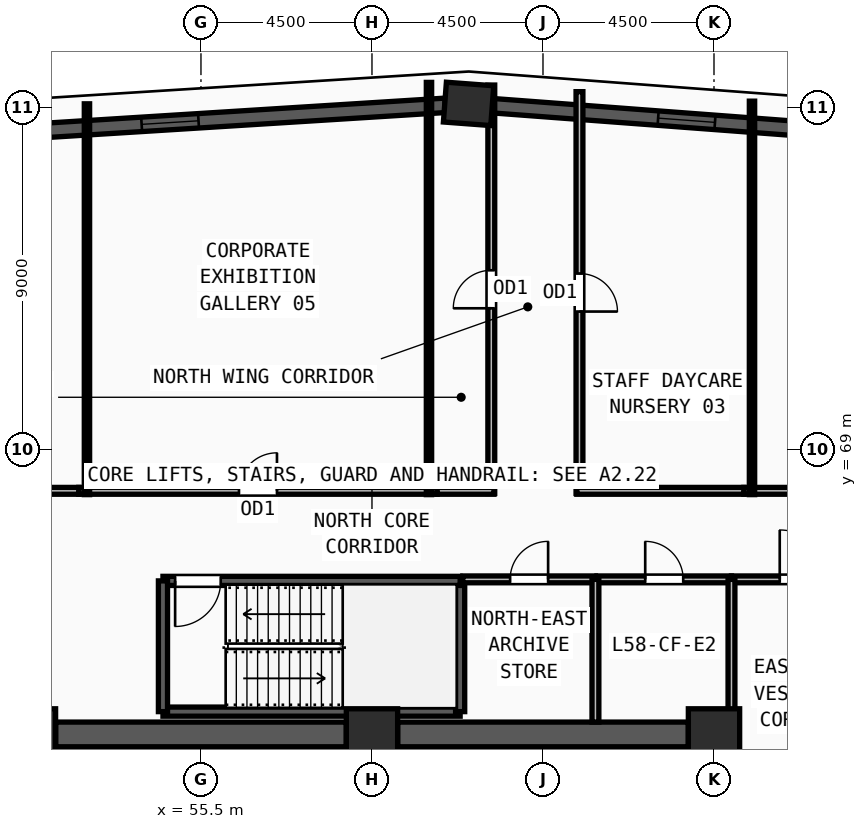
"""IFC4 building model, lengths in metres.
Left out: names, types, materials, properties, quantities, classifications, styles, units other than length and angle.
Written with IfcOpenShell. Run it as: python <this file> out.ifc"""

import sys

from ifc_helpers import new_model, si_unit, direction, frame, frame_2d, origin, origin_2d, place, context, subcontext, project, spatial, rectangle, extrude, source, transform, mapped, element, fill, save


model = new_model("IFC4")
c1 = context("Model", 3, precision=1e-05, world=origin(), true_north=direction((0.0, 1.0)))
c2 = subcontext(c1, "Body", "Model", "MODEL_VIEW")
j1 = project(units=[si_unit("LENGTHUNIT", "METRE"), si_unit("PLANEANGLEUNIT", "RADIAN")], contexts=[c1])
p1 = place(None, origin())
s1 = spatial("IfcSite", under=j1, at=p1, CompositionType="ELEMENT")
p2 = place(p1, origin())
s2 = spatial("IfcBuilding", under=s1, at=p2, CompositionType="ELEMENT")
p3 = place(p2, frame((0.0, 0.0, 224.25)))
s3 = spatial("IfcBuildingStorey", under=s2, at=p3, CompositionType="ELEMENT", Elevation=224.25)
m1 = source(origin(), c2, "Body", "SweptSolid", [
    extrude(rectangle(XDim=1.35, YDim=1.35, at=origin_2d()), origin(), (0.0, 0.0, 1.0), 3.75),
])
for number, where, z_axis, x_axis in (
    (1, (69.0, 61.5, 0.0), (0.0, 0.0, 1.0), (1.0, 0.0, 0.0)),
    (2, (60.0, 61.5, 0.0), (0.0, 0.0, 1.0), (1.0, 0.0, 0.0)),
    (3, (51.0, 61.5, 0.0), (0.0, 0.0, 1.0), (1.0, 0.0, 0.0)),
):
    element("IfcColumn", number, at=place(p3, frame(where, z_axis=z_axis, x_axis=x_axis)), inside=s3, PredefinedType="COLUMN", context=c2, shape_type="MappedRepresentation", body=[
        mapped(m1, transform((0.0, 0.0, 0.0), x_axis=(1.0, 0.0, 0.0), y_axis=(0.0, 1.0, 0.0), z_axis=(0.0, 0.0, 1.0), scale=1.0)),
    ])
m2 = source(origin(), c2, "Body", "SweptSolid", [
    extrude(rectangle(XDim=1.25, YDim=1.05, at=origin_2d()), origin(), (0.0, 0.0, 1.0), 3.75),
])
p4 = place(p3, frame((62.542, 78.091, 0.0), z_axis=(0.0, 0.0, 1.0), x_axis=(-0.997198204594, 0.074804684047, 0.0)))
e4 = element("IfcColumn", 4, at=p4, inside=s3, PredefinedType="COLUMN", context=c2, shape_type="MappedRepresentation", body=[
    mapped(m2, transform((0.0, 0.0, 0.0), x_axis=(1.0, 0.0, 0.0), y_axis=(0.0, 1.0, 0.0), z_axis=(0.0, 0.0, 1.0), scale=1.0)),
])
p5 = place(p3, frame((87.036, 76.253, 0.0), z_axis=(0.0, 0.0, 1.0), x_axis=(-0.997196419931, 0.07482847103, 0.0)))
e5 = element("IfcWall", 5, at=p5, inside=s3, PredefinedType="SOLIDWALL", context=c2, shape_type="SweptSolid", body=[
    extrude(rectangle(XDim=23.948, YDim=0.38, at=frame_2d((11.974, 0.0))), origin(), (0.0, 0.0, 1.0), 3.57),
])
m3 = source(origin(), c2, "Body", "SweptSolid", [
    extrude(rectangle(XDim=1.5, YDim=1.9, at=frame_2d((0.75, 0.95))), frame((0.0, 0.2, 0.0), z_axis=(0.0, -1.0, 0.0), x_axis=(1.0, 0.0, 0.0)), (0.0, 0.0, 1.0), 0.4),
])
p6 = place(p5, frame((5.237, 0.0, 0.55)))
e6 = element("IfcOpeningElement", 6, at=p6, cuts=e5, PredefinedType="OPENING", context=c2, shape_type="MappedRepresentation", body=[
    mapped(m3, transform((0.0, 0.0, 0.0), x_axis=(1.0, 0.0, 0.0), y_axis=(0.0, 1.0, 0.0), z_axis=(0.0, 0.0, 1.0), scale=1.0)),
])
p7 = place(p5, frame((11.224, 0.0, 0.55)))
e7 = element("IfcOpeningElement", 7, at=p7, cuts=e5, PredefinedType="OPENING", context=c2, shape_type="MappedRepresentation", body=[
    mapped(m3, transform((0.0, 0.0, 0.0), x_axis=(1.0, 0.0, 0.0), y_axis=(0.0, 1.0, 0.0), z_axis=(0.0, 0.0, 1.0), scale=1.0)),
])
p8 = place(p5, frame((18.061, 0.0, 0.55)))
e8 = element("IfcOpeningElement", 8, at=p8, cuts=e5, PredefinedType="OPENING", context=c2, shape_type="MappedRepresentation", body=[
    mapped(m3, transform((0.0, 0.0, 0.0), x_axis=(1.0, 0.0, 0.0), y_axis=(0.0, 1.0, 0.0), z_axis=(0.0, 0.0, 1.0), scale=1.0)),
])
p9 = place(p3, frame((61.928, 78.053, 0.0), z_axis=(0.0, 0.0, 1.0), x_axis=(-0.998042647874, -0.062536973258, 0.0)))
e9 = element("IfcWall", 9, at=p9, inside=s3, PredefinedType="SOLIDWALL", context=c2, shape_type="SweptSolid", body=[
    extrude(rectangle(XDim=29.022, YDim=0.38, at=frame_2d((14.511, 0.0))), origin(), (0.0, 0.0, 1.0), 3.57),
])
p10 = place(p9, frame((6.505, 0.0, 0.55)))
e10 = element("IfcOpeningElement", 10, at=p10, cuts=e9, PredefinedType="OPENING", context=c2, shape_type="MappedRepresentation", body=[
    mapped(m3, transform((0.0, 0.0, 0.0), x_axis=(1.0, 0.0, 0.0), y_axis=(0.0, 1.0, 0.0), z_axis=(0.0, 0.0, 1.0), scale=1.0)),
])
p11 = place(p9, frame((13.761, 0.0, 0.55)))
e11 = element("IfcOpeningElement", 11, at=p11, cuts=e9, PredefinedType="OPENING", context=c2, shape_type="MappedRepresentation", body=[
    mapped(m3, transform((0.0, 0.0, 0.0), x_axis=(1.0, 0.0, 0.0), y_axis=(0.0, 1.0, 0.0), z_axis=(0.0, 0.0, 1.0), scale=1.0)),
])
p12 = place(p9, frame((21.016, 0.0, 0.55)))
e12 = element("IfcOpeningElement", 12, at=p12, cuts=e9, PredefinedType="OPENING", context=c2, shape_type="MappedRepresentation", body=[
    mapped(m3, transform((0.0, 0.0, 0.0), x_axis=(1.0, 0.0, 0.0), y_axis=(0.0, 1.0, 0.0), z_axis=(0.0, 0.0, 1.0), scale=1.0)),
])
for number, where, z_axis, x_axis in (
    (13, (51.675, 61.5, 0.0), (0.0, 0.0, 1.0), (1.0, 0.0, 0.0)),
    (14, (60.675, 61.5, 0.0), (0.0, 0.0, 1.0), (1.0, 0.0, 0.0)),
):
    element("IfcWall", number, at=place(p3, frame(where, z_axis=z_axis, x_axis=x_axis)), inside=s3, PredefinedType="SHEAR", context=c2, shape_type="SweptSolid", body=[
        extrude(rectangle(XDim=7.65, YDim=0.65, at=frame_2d((3.825, 0.0))), origin(), (0.0, 0.0, 1.0), 3.57),
    ])
p13 = place(p3, frame((54.5, 62.1, 0.0), z_axis=(0.0, 0.0, 1.0), x_axis=(1.0, 0.0, 0.0)))
e15 = element("IfcWall", 15, at=p13, inside=s3, PredefinedType="SOLIDWALL", context=c2, shape_type="SweptSolid", body=[
    extrude(rectangle(XDim=7.82, YDim=0.24, at=frame_2d((3.91, 0.0))), origin(), (0.0, 0.0, 1.0), 3.57),
])
p14 = place(p3, frame((62.32, 62.1, 0.0), z_axis=(0.0, 0.0, 1.0), x_axis=(0.0, 1.0, 0.0)))
e16 = element("IfcWall", 16, at=p14, inside=s3, PredefinedType="SOLIDWALL", context=c2, shape_type="SweptSolid", body=[
    extrude(rectangle(XDim=3.44, YDim=0.24, at=frame_2d((1.72, 0.0))), origin(), (0.0, 0.0, 1.0), 3.57),
])
p15 = place(p3, frame((62.32, 65.54, 0.0), z_axis=(0.0, 0.0, 1.0), x_axis=(-1.0, 0.0, 0.0)))
e17 = element("IfcWall", 17, at=p15, inside=s3, PredefinedType="SOLIDWALL", context=c2, shape_type="SweptSolid", body=[
    extrude(rectangle(XDim=7.82, YDim=0.24, at=frame_2d((3.91, 0.0))), origin(), (0.0, 0.0, 1.0), 3.57),
])
m4 = source(origin(), c2, "Body", "SweptSolid", [
    extrude(rectangle(XDim=1.2, YDim=2.2, at=frame_2d((0.6, 1.1))), frame((0.0, 0.13, 0.0), z_axis=(0.0, -1.0, 0.0), x_axis=(1.0, 0.0, 0.0)), (0.0, 0.0, 1.0), 0.26),
])
p16 = place(p15, frame((6.3, 0.0, 0.0)))
e18 = element("IfcOpeningElement", 18, at=p16, cuts=e17, PredefinedType="OPENING", context=c2, shape_type="MappedRepresentation", body=[
    mapped(m4, transform((0.0, 0.0, 0.0), x_axis=(1.0, 0.0, 0.0), y_axis=(0.0, 1.0, 0.0), z_axis=(0.0, 0.0, 1.0), scale=1.0)),
])
p17 = place(p3, frame((54.5, 65.54, 0.0), z_axis=(0.0, 0.0, 1.0), x_axis=(0.0, -1.0, 0.0)))
e19 = element("IfcWall", 19, at=p17, inside=s3, PredefinedType="SOLIDWALL", context=c2, shape_type="SweptSolid", body=[
    extrude(rectangle(XDim=3.44, YDim=0.24, at=frame_2d((1.72, 0.0))), origin(), (0.0, 0.0, 1.0), 3.57),
])
p18 = place(p3, frame((62.39, 65.58, 0.0), z_axis=(0.0, 0.0, 1.0), x_axis=(1.0, 0.0, 0.0)))
e20 = element("IfcWall", 20, at=p18, inside=s3, PredefinedType="PARTITIONING", context=c2, shape_type="SweptSolid", body=[
    extrude(rectangle(XDim=3.49, YDim=0.18, at=frame_2d((1.745, 0.0))), origin(), (0.0, 0.0, 1.0), 3.57),
])
m5 = source(origin(), c2, "Body", "SweptSolid", [
    extrude(rectangle(XDim=1.0, YDim=2.2, at=frame_2d((0.5, 1.1))), frame((0.0, 0.1, 0.0), z_axis=(0.0, -1.0, 0.0), x_axis=(1.0, 0.0, 0.0)), (0.0, 0.0, 1.0), 0.2),
])
p19 = place(p18, frame((1.245, 0.0, 0.0)))
e21 = element("IfcOpeningElement", 21, at=p19, cuts=e20, PredefinedType="OPENING", context=c2, shape_type="MappedRepresentation", body=[
    mapped(m5, transform((0.0, 0.0, 0.0), x_axis=(1.0, 0.0, 0.0), y_axis=(0.0, 1.0, 0.0), z_axis=(0.0, 0.0, 1.0), scale=1.0)),
])
p20 = place(p3, frame((65.92, 65.58, 0.0), z_axis=(0.0, 0.0, 1.0), x_axis=(1.0, 0.0, 0.0)))
e22 = element("IfcWall", 22, at=p20, inside=s3, PredefinedType="PARTITIONING", context=c2, shape_type="SweptSolid", body=[
    extrude(rectangle(XDim=3.54, YDim=0.18, at=frame_2d((1.77, 0.0))), origin(), (0.0, 0.0, 1.0), 3.57),
])
p21 = place(p20, frame((1.27, 0.0, 0.0)))
e23 = element("IfcOpeningElement", 23, at=p21, cuts=e22, PredefinedType="OPENING", context=c2, shape_type="MappedRepresentation", body=[
    mapped(m5, transform((0.0, 0.0, 0.0), x_axis=(1.0, 0.0, 0.0), y_axis=(0.0, 1.0, 0.0), z_axis=(0.0, 0.0, 1.0), scale=1.0)),
])
p22 = place(p3, frame((69.46, 65.58, 0.0), z_axis=(0.0, 0.0, 1.0), x_axis=(1.0, 0.0, 0.0)))
e24 = element("IfcWall", 24, at=p22, inside=s3, PredefinedType="PARTITIONING", context=c2, shape_type="SweptSolid", body=[
    extrude(rectangle(XDim=3.84, YDim=0.18, at=frame_2d((1.92, 0.0))), origin(), (0.0, 0.0, 1.0), 3.57),
])
m6 = source(origin(), c2, "Body", "SweptSolid", [
    extrude(rectangle(XDim=1.3, YDim=2.2, at=frame_2d((0.65, 1.1))), frame((0.0, 0.1, 0.0), z_axis=(0.0, -1.0, 0.0), x_axis=(1.0, 0.0, 0.0)), (0.0, 0.0, 1.0), 0.2),
])
p23 = place(p22, frame((1.27, 0.0, 0.0)))
e25 = element("IfcOpeningElement", 25, at=p23, cuts=e24, PredefinedType="OPENING", context=c2, shape_type="MappedRepresentation", body=[
    mapped(m6, transform((0.0, 0.0, 0.0), x_axis=(1.0, 0.0, 0.0), y_axis=(0.0, 1.0, 0.0), z_axis=(0.0, 0.0, 1.0), scale=1.0)),
])
p24 = place(p3, frame((69.785, 67.91, 0.0), z_axis=(0.0, 0.0, 1.0), x_axis=(1.0, 0.0, 0.0)))
e26 = element("IfcWall", 26, at=p24, inside=s3, PredefinedType="PARTITIONING", context=c2, shape_type="SweptSolid", body=[
    extrude(rectangle(XDim=5.845, YDim=0.18, at=frame_2d((2.922, 0.0))), origin(), (0.0, 0.0, 1.0), 3.57),
])
m7 = source(origin(), c2, "Body", "SweptSolid", [
    extrude(rectangle(XDim=1.5, YDim=2.2, at=frame_2d((0.75, 1.1))), frame((0.0, 0.1, 0.0), z_axis=(0.0, -1.0, 0.0), x_axis=(1.0, 0.0, 0.0)), (0.0, 0.0, 1.0), 0.2),
])
p25 = place(p24, frame((2.172, 0.0, 0.0)))
e27 = element("IfcOpeningElement", 27, at=p25, cuts=e26, PredefinedType="OPENING", context=c2, shape_type="MappedRepresentation", body=[
    mapped(m7, transform((0.0, 0.0, 0.0), x_axis=(1.0, 0.0, 0.0), y_axis=(0.0, 1.0, 0.0), z_axis=(0.0, 0.0, 1.0), scale=1.0)),
])
p26 = place(p3, frame((65.46, 78.413, 0.0), z_axis=(0.0, 0.0, 1.0), x_axis=(0.0, -1.0, 0.0)))
e28 = element("IfcWall", 28, at=p26, inside=s3, PredefinedType="PARTITIONING", context=c2, shape_type="SweptSolid", body=[
    extrude(rectangle(XDim=10.573, YDim=0.18, at=frame_2d((5.287, 0.0))), origin(), (0.0, 0.0, 1.0), 3.57),
])
p27 = place(p26, frame((4.786, 0.0, 0.0)))
e29 = element("IfcOpeningElement", 29, at=p27, cuts=e28, PredefinedType="OPENING", context=c2, shape_type="MappedRepresentation", body=[
    mapped(m5, transform((0.0, 0.0, 0.0), x_axis=(1.0, 0.0, 0.0), y_axis=(0.0, 1.0, 0.0), z_axis=(0.0, 0.0, 1.0), scale=1.0)),
])
p28 = place(p3, frame((63.14, 67.84, 0.0), z_axis=(0.0, 0.0, 1.0), x_axis=(0.0, 1.0, 0.0)))
e30 = element("IfcWall", 30, at=p28, inside=s3, PredefinedType="PARTITIONING", context=c2, shape_type="SweptSolid", body=[
    extrude(rectangle(XDim=10.747, YDim=0.18, at=frame_2d((5.374, 0.0))), origin(), (0.0, 0.0, 1.0), 3.57),
])
p29 = place(p28, frame((4.873, 0.0, 0.0)))
e31 = element("IfcOpeningElement", 31, at=p29, cuts=e30, PredefinedType="OPENING", context=c2, shape_type="MappedRepresentation", body=[
    mapped(m5, transform((0.0, 0.0, 0.0), x_axis=(1.0, 0.0, 0.0), y_axis=(0.0, 1.0, 0.0), z_axis=(0.0, 0.0, 1.0), scale=1.0)),
])
p30 = place(p3, frame((52.285, 67.91, 0.0), z_axis=(0.0, 0.0, 1.0), x_axis=(1.0, 0.0, 0.0)))
e32 = element("IfcWall", 32, at=p30, inside=s3, PredefinedType="PARTITIONING", context=c2, shape_type="SweptSolid", body=[
    extrude(rectangle(XDim=9.43, YDim=0.18, at=frame_2d((4.715, 0.0))), origin(), (0.0, 0.0, 1.0), 3.57),
])
p31 = place(p30, frame((4.215, 0.0, 0.0)))
e33 = element("IfcOpeningElement", 33, at=p31, cuts=e32, PredefinedType="OPENING", context=c2, shape_type="MappedRepresentation", body=[
    mapped(m5, transform((0.0, 0.0, 0.0), x_axis=(1.0, 0.0, 0.0), y_axis=(0.0, 1.0, 0.0), z_axis=(0.0, 0.0, 1.0), scale=1.0)),
])
p32 = place(p3, frame((44.37, 67.91, 0.0), z_axis=(0.0, 0.0, 1.0), x_axis=(1.0, 0.0, 0.0)))
e34 = element("IfcWall", 34, at=p32, inside=s3, PredefinedType="PARTITIONING", context=c2, shape_type="SweptSolid", body=[
    extrude(rectangle(XDim=7.915, YDim=0.18, at=frame_2d((3.958, 0.0))), origin(), (0.0, 0.0, 1.0), 3.205),
])
p33 = place(p32, frame((3.207, 0.0, 0.0)))
e35 = element("IfcOpeningElement", 35, at=p33, cuts=e34, PredefinedType="OPENING", context=c2, shape_type="MappedRepresentation", body=[
    mapped(m7, transform((0.0, 0.0, 0.0), x_axis=(1.0, 0.0, 0.0), y_axis=(0.0, 1.0, 0.0), z_axis=(0.0, 0.0, 1.0), scale=1.0)),
])
p34 = place(p3, frame((65.88, 61.825, 0.0), z_axis=(0.0, 0.0, 1.0), x_axis=(0.0, 1.0, 0.0)))
e36 = element("IfcWall", 36, at=p34, inside=s3, PredefinedType="PARTITIONING", context=c2, shape_type="SweptSolid", body=[
    extrude(rectangle(XDim=3.755, YDim=0.18, at=frame_2d((1.877, 0.0))), origin(), (0.0, 0.0, 1.0), 3.57),
])
p35 = place(p3, frame((69.46, 61.95, 0.0), z_axis=(0.0, 0.0, 1.0), x_axis=(0.0, 1.0, 0.0)))
e37 = element("IfcWall", 37, at=p35, inside=s3, PredefinedType="PARTITIONING", context=c2, shape_type="SweptSolid", body=[
    extrude(rectangle(XDim=3.63, YDim=0.18, at=frame_2d((1.815, 0.0))), origin(), (0.0, 0.0, 1.0), 3.57),
])
p36 = place(p3, frame((65.39, 67.91, 0.0), z_axis=(0.0, 0.0, 1.0), x_axis=(1.0, 0.0, 0.0)))
e38 = element("IfcWall", 38, at=p36, inside=s3, PredefinedType="PARTITIONING", context=c2, shape_type="SweptSolid", body=[
    extrude(rectangle(XDim=4.395, YDim=0.18, at=frame_2d((2.198, 0.0))), origin(), (0.0, 0.0, 1.0), 3.57),
])
p37 = place(p3, frame((61.715, 67.91, 0.0), z_axis=(0.0, 0.0, 1.0), x_axis=(1.0, 0.0, 0.0)))
e39 = element("IfcWall", 39, at=p37, inside=s3, PredefinedType="PARTITIONING", context=c2, shape_type="SweptSolid", body=[
    extrude(rectangle(XDim=1.495, YDim=0.18, at=frame_2d((0.748, 0.0))), origin(), (0.0, 0.0, 1.0), 3.57),
])
p38 = place(p3, frame((52.5, 67.81, 0.0), z_axis=(0.0, 0.0, 1.0), x_axis=(0.0, 1.0, 0.0)))
e40 = element("IfcWall", 40, at=p38, inside=s3, PredefinedType="PARTITIONING", context=c2, shape_type="SweptSolid", body=[
    extrude(rectangle(XDim=10.283, YDim=0.14, at=frame_2d((5.142, 0.0))), origin(), (0.0, 0.0, 1.0), 3.57),
])
p39 = place(p3, frame((61.5, 67.81, 0.0), z_axis=(0.0, 0.0, 1.0), x_axis=(0.0, 1.0, 0.0)))
e41 = element("IfcWall", 41, at=p39, inside=s3, PredefinedType="PARTITIONING", context=c2, shape_type="SweptSolid", body=[
    extrude(rectangle(XDim=10.847, YDim=0.14, at=frame_2d((5.423, 0.0))), origin(), (0.0, 0.0, 1.0), 3.57),
])
p40 = place(p3, frame((70.0, 67.81, 0.0), z_axis=(0.0, 0.0, 1.0), x_axis=(0.0, 1.0, 0.0)))
e42 = element("IfcWall", 42, at=p40, inside=s3, PredefinedType="PARTITIONING", context=c2, shape_type="SweptSolid", body=[
    extrude(rectangle(XDim=10.353, YDim=0.14, at=frame_2d((5.177, 0.0))), origin(), (0.0, 0.0, 1.0), 3.57),
])
m8 = source(origin(), c2, "Body", "SweptSolid", [
    extrude(rectangle(XDim=1.5, YDim=1.9, at=frame_2d((0.75, 0.95))), frame((0.0, 0.03, 0.0), z_axis=(0.0, -1.0, 0.0), x_axis=(1.0, 0.0, 0.0)), (0.0, 0.0, 1.0), 0.06),
])
p41 = place(p8, origin())
e43 = element("IfcWindow", 43, at=p41, inside=s3, PartitioningType="DOUBLE_PANEL_VERTICAL", PredefinedType="WINDOW", context=c2, shape_type="MappedRepresentation", body=[
    mapped(m8, transform((0.0, 0.0, 0.0), x_axis=(1.0, 0.0, 0.0), y_axis=(0.0, 1.0, 0.0), z_axis=(0.0, 0.0, 1.0), scale=1.0)),
])
fill(e8, e43)
p42 = place(p10, origin())
e44 = element("IfcWindow", 44, at=p42, inside=s3, PartitioningType="DOUBLE_PANEL_VERTICAL", PredefinedType="WINDOW", context=c2, shape_type="MappedRepresentation", body=[
    mapped(m8, transform((0.0, 0.0, 0.0), x_axis=(1.0, 0.0, 0.0), y_axis=(0.0, 1.0, 0.0), z_axis=(0.0, 0.0, 1.0), scale=1.0)),
])
fill(e10, e44)
m9 = source(origin(), c2, "Body", "SweptSolid", [
    extrude(rectangle(XDim=1.2, YDim=2.2, at=frame_2d((0.6, 1.1))), frame((0.0, 0.025, 0.0), z_axis=(0.0, -1.0, 0.0), x_axis=(1.0, 0.0, 0.0)), (0.0, 0.0, 1.0), 0.05),
])
p43 = place(p16, origin())
e45 = element("IfcDoor", 45, at=p43, inside=s3, OperationType="SINGLE_SWING_RIGHT", PredefinedType="DOOR", context=c2, shape_type="MappedRepresentation", body=[
    mapped(m9, transform((0.0, 0.0, 0.0), x_axis=(1.0, 0.0, 0.0), y_axis=(0.0, 1.0, 0.0), z_axis=(0.0, 0.0, 1.0), scale=1.0)),
])
fill(e18, e45)
m10 = source(origin(), c2, "Body", "SweptSolid", [
    extrude(rectangle(XDim=1.0, YDim=2.2, at=frame_2d((0.5, 1.1))), frame((0.0, 0.025, 0.0), z_axis=(0.0, -1.0, 0.0), x_axis=(1.0, 0.0, 0.0)), (0.0, 0.0, 1.0), 0.05),
])
p44 = place(p19, origin())
e46 = element("IfcDoor", 46, at=p44, inside=s3, OperationType="SINGLE_SWING_RIGHT", PredefinedType="DOOR", context=c2, shape_type="MappedRepresentation", body=[
    mapped(m10, transform((0.0, 0.0, 0.0), x_axis=(1.0, 0.0, 0.0), y_axis=(0.0, 1.0, 0.0), z_axis=(0.0, 0.0, 1.0), scale=1.0)),
])
fill(e21, e46)
p45 = place(p21, origin())
e47 = element("IfcDoor", 47, at=p45, inside=s3, OperationType="SINGLE_SWING_LEFT", PredefinedType="DOOR", context=c2, shape_type="MappedRepresentation", body=[
    mapped(m10, transform((0.0, 0.0, 0.0), x_axis=(1.0, 0.0, 0.0), y_axis=(0.0, 1.0, 0.0), z_axis=(0.0, 0.0, 1.0), scale=1.0)),
])
fill(e23, e47)
m11 = source(origin(), c2, "Body", "SweptSolid", [
    extrude(rectangle(XDim=1.3, YDim=2.2, at=frame_2d((0.65, 1.1))), frame((0.0, 0.025, 0.0), z_axis=(0.0, -1.0, 0.0), x_axis=(1.0, 0.0, 0.0)), (0.0, 0.0, 1.0), 0.05),
])
p46 = place(p23, origin())
e48 = element("IfcDoor", 48, at=p46, inside=s3, OperationType="SINGLE_SWING_LEFT", PredefinedType="DOOR", context=c2, shape_type="MappedRepresentation", body=[
    mapped(m11, transform((0.0, 0.0, 0.0), x_axis=(1.0, 0.0, 0.0), y_axis=(0.0, 1.0, 0.0), z_axis=(0.0, 0.0, 1.0), scale=1.0)),
])
fill(e25, e48)
p47 = place(p27, origin())
e49 = element("IfcDoor", 49, at=p47, inside=s3, OperationType="SINGLE_SWING_RIGHT", PredefinedType="DOOR", context=c2, shape_type="MappedRepresentation", body=[
    mapped(m10, transform((0.0, 0.0, 0.0), x_axis=(1.0, 0.0, 0.0), y_axis=(0.0, 1.0, 0.0), z_axis=(0.0, 0.0, 1.0), scale=1.0)),
])
fill(e29, e49)
p48 = place(p29, origin())
e50 = element("IfcDoor", 50, at=p48, inside=s3, OperationType="SINGLE_SWING_LEFT", PredefinedType="DOOR", context=c2, shape_type="MappedRepresentation", body=[
    mapped(m10, transform((0.0, 0.0, 0.0), x_axis=(1.0, 0.0, 0.0), y_axis=(0.0, 1.0, 0.0), z_axis=(0.0, 0.0, 1.0), scale=1.0)),
])
fill(e31, e50)
p49 = place(p31, origin())
e51 = element("IfcDoor", 51, at=p49, inside=s3, OperationType="SINGLE_SWING_RIGHT", PredefinedType="DOOR", context=c2, shape_type="MappedRepresentation", body=[
    mapped(m10, transform((0.0, 0.0, 0.0), x_axis=(1.0, 0.0, 0.0), y_axis=(0.0, 1.0, 0.0), z_axis=(0.0, 0.0, 1.0), scale=1.0)),
])
fill(e33, e51)
save(model, sys.argv[1])
